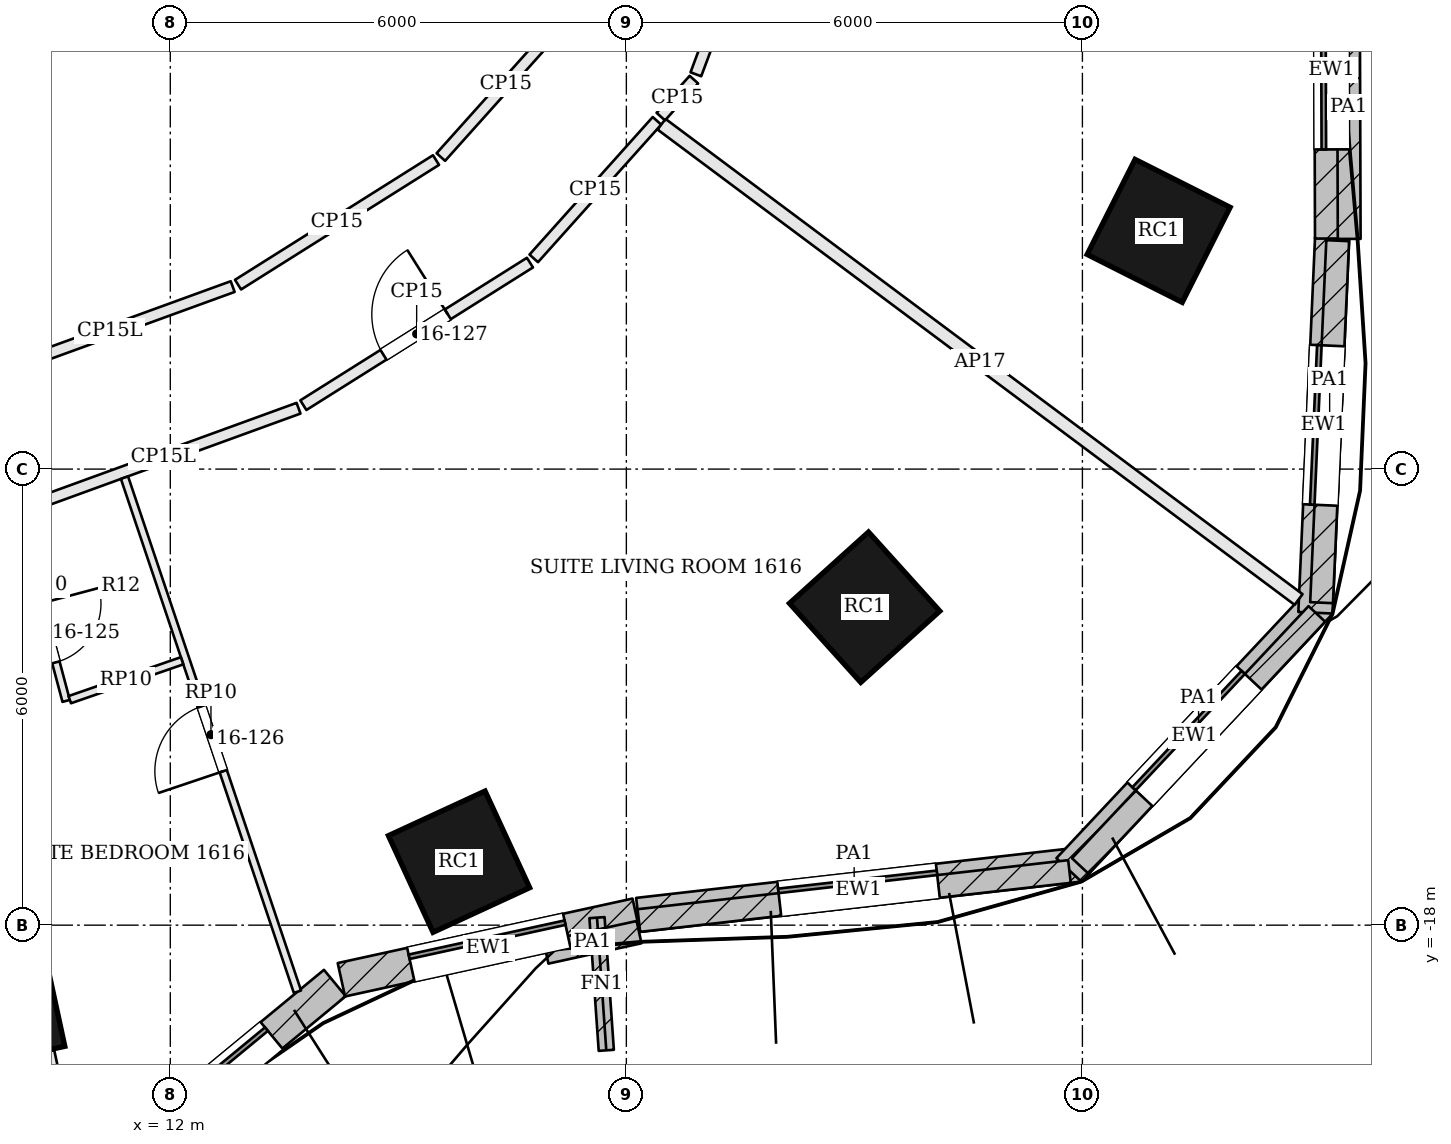
"""IFC4 building model, lengths in metres.
Left out: names, types, materials, properties, quantities, classifications, styles, units other than length and angle.
Written with IfcOpenShell. Run it as: python <this file> out.ifc"""

import sys

from ifc_helpers import new_model, si_unit, direction, frame, frame_2d, origin, origin_2d, place, context, subcontext, project, spatial, rectangle, extrude, element, fill, save


model = new_model("IFC4")
c1 = context("Model", 3, precision=1e-05, world=origin(), true_north=direction((0.0, 1.0)))
c2 = subcontext(c1, "Body", "Model", "MODEL_VIEW")
j1 = project(units=[si_unit("LENGTHUNIT", "METRE"), si_unit("PLANEANGLEUNIT", "RADIAN")], contexts=[c1])
p1 = place(None, origin())
s1 = spatial("IfcSite", under=j1, at=p1, CompositionType="ELEMENT")
p2 = place(p1, origin())
s2 = spatial("IfcBuilding", under=s1, at=p2, CompositionType="ELEMENT")
p3 = place(p2, frame((0.0, 0.0, 73.5)))
s3 = spatial("IfcBuildingStorey", under=s2, at=p3, CompositionType="ELEMENT", Elevation=73.5)
for number, where, z_axis, x_axis in (
    (1, (9.78, -19.058, 0.0), (0.0, 0.0, 1.0), (0.977, 0.211, 0.0)),
    (2, (15.799, -17.165, 0.0), (0.0, 0.0, 1.0), (0.908, 0.419, 0.0)),
    (3, (21.135, -13.817, 0.0), (0.0, 0.0, 1.0), (0.743, 0.67, 0.0)),
    (4, (25.003, -8.866, 0.0), (0.0, 0.0, 1.0), (0.45, 0.893, 0.0)),
):
    element("IfcColumn", number, at=place(p3, frame(where, z_axis=z_axis, x_axis=x_axis)), inside=s3, PredefinedType="COLUMN", context=c2, shape_type="SweptSolid", body=[
        extrude(rectangle(XDim=1.4, YDim=1.4, at=origin_2d()), origin(), (0.0, 0.0, 1.0), 2.8),
    ])
p4 = place(p3, frame((10.879, -21.473, 0.0), z_axis=(0.0, 0.0, 1.0), x_axis=(0.77124668946, 0.636536365023, 0.0)))
e5 = element("IfcWall", 5, at=p4, inside=s3, PredefinedType="SOLIDWALL", context=c2, shape_type="SweptSolid", body=[
    extrude(rectangle(XDim=4.261, YDim=0.45, at=frame_2d((2.13, 0.0))), origin(), (0.0, 0.0, 1.0), 3.3),
])
p5 = place(p4, frame((1.08, 0.0, 0.9)))
e6 = element("IfcOpeningElement", 6, at=p5, cuts=e5, PredefinedType="OPENING", context=c2, shape_type="SweptSolid", body=[
    extrude(rectangle(XDim=2.1, YDim=1.8, at=frame_2d((1.05, 0.9))), frame((0.0, 0.235, 0.0), z_axis=(0.0, -1.0, 0.0), x_axis=(1.0, 0.0, 0.0)), (0.0, 0.0, 1.0), 0.47),
])
p6 = place(p3, frame((14.251, -18.718, 0.0), z_axis=(0.0, 0.0, 1.0), x_axis=(0.976903627618, 0.213680374267, 0.0)))
e7 = element("IfcWall", 7, at=p6, inside=s3, PredefinedType="SOLIDWALL", context=c2, shape_type="SweptSolid", body=[
    extrude(rectangle(XDim=3.97, YDim=0.45, at=frame_2d((1.985, 0.0))), origin(), (0.0, 0.0, 1.0), 3.3),
])
p7 = place(p6, frame((0.935, 0.0, 0.9)))
e8 = element("IfcOpeningElement", 8, at=p7, cuts=e7, PredefinedType="OPENING", context=c2, shape_type="SweptSolid", body=[
    extrude(rectangle(XDim=2.1, YDim=1.8, at=frame_2d((1.05, 0.9))), frame((0.0, 0.235, 0.0), z_axis=(0.0, -1.0, 0.0), x_axis=(1.0, 0.0, 0.0)), (0.0, 0.0, 1.0), 0.47),
])
p8 = place(p3, frame((18.154, -17.865, 0.0), z_axis=(0.0, 0.0, 1.0), x_axis=(0.993572909097, 0.113193967633, 0.0)))
e9 = element("IfcWall", 9, at=p8, inside=s3, PredefinedType="SOLIDWALL", context=c2, shape_type="SweptSolid", body=[
    extrude(rectangle(XDim=5.839, YDim=0.45, at=frame_2d((2.919, 0.0))), origin(), (0.0, 0.0, 1.0), 3.3),
])
p9 = place(p8, frame((1.869, 0.0, 0.9)))
e10 = element("IfcOpeningElement", 10, at=p9, cuts=e9, PredefinedType="OPENING", context=c2, shape_type="SweptSolid", body=[
    extrude(rectangle(XDim=2.1, YDim=1.8, at=frame_2d((1.05, 0.9))), frame((0.0, 0.235, 0.0), z_axis=(0.0, -1.0, 0.0), x_axis=(1.0, 0.0, 0.0)), (0.0, 0.0, 1.0), 0.47),
])
p10 = place(p3, frame((23.822, -17.273, 0.0), z_axis=(0.0, 0.0, 1.0), x_axis=(0.684173167988, 0.729319598122, 0.0)))
e11 = element("IfcWall", 11, at=p10, inside=s3, PredefinedType="SOLIDWALL", context=c2, shape_type="SweptSolid", body=[
    extrude(rectangle(XDim=4.829, YDim=0.45, at=frame_2d((2.415, 0.0))), origin(), (0.0, 0.0, 1.0), 3.3),
])
p11 = place(p10, frame((1.365, 0.0, 0.9)))
e12 = element("IfcOpeningElement", 12, at=p11, cuts=e11, PredefinedType="OPENING", context=c2, shape_type="SweptSolid", body=[
    extrude(rectangle(XDim=2.1, YDim=1.8, at=frame_2d((1.05, 0.9))), frame((0.0, 0.235, 0.0), z_axis=(0.0, -1.0, 0.0), x_axis=(1.0, 0.0, 0.0)), (0.0, 0.0, 1.0), 0.47),
])
p12 = place(p3, frame((27.065, -13.89, 0.0), z_axis=(0.0, 0.0, 1.0), x_axis=(0.044544250924, 0.99900741224, 0.0)))
e13 = element("IfcWall", 13, at=p12, inside=s3, PredefinedType="SOLIDWALL", context=c2, shape_type="SweptSolid", body=[
    extrude(rectangle(XDim=4.938, YDim=0.45, at=frame_2d((2.469, 0.0))), origin(), (0.0, 0.0, 1.0), 3.3),
])
p13 = place(p12, frame((1.419, 0.0, 0.9)))
e14 = element("IfcOpeningElement", 14, at=p13, cuts=e13, PredefinedType="OPENING", context=c2, shape_type="SweptSolid", body=[
    extrude(rectangle(XDim=2.1, YDim=1.8, at=frame_2d((1.05, 0.9))), frame((0.0, 0.235, 0.0), z_axis=(0.0, -1.0, 0.0), x_axis=(1.0, 0.0, 0.0)), (0.0, 0.0, 1.0), 0.47),
])
p14 = place(p3, frame((27.285, -8.967, 0.0), z_axis=(0.0, 0.0, 1.0), x_axis=(-0.003185571797, 0.999994926053, 0.0)))
e15 = element("IfcWall", 15, at=p14, inside=s3, PredefinedType="SOLIDWALL", context=c2, shape_type="SweptSolid", body=[
    extrude(rectangle(XDim=4.445, YDim=0.45, at=frame_2d((2.223, 0.0))), origin(), (0.0, 0.0, 1.0), 3.3),
])
p15 = place(p14, frame((1.173, 0.0, 0.9)))
e16 = element("IfcOpeningElement", 16, at=p15, cuts=e15, PredefinedType="OPENING", context=c2, shape_type="SweptSolid", body=[
    extrude(rectangle(XDim=2.1, YDim=1.8, at=frame_2d((1.05, 0.9))), frame((0.0, 0.235, 0.0), z_axis=(0.0, -1.0, 0.0), x_axis=(1.0, 0.0, 0.0)), (0.0, 0.0, 1.0), 0.47),
])
p16 = place(p3, frame((17.614, -17.901, 0.0), z_axis=(0.0, 0.0, 1.0), x_axis=(0.069750000204, -0.997564502913, 0.0)))
e17 = element("IfcWall", 17, at=p16, inside=s3, PredefinedType="SOLIDWALL", context=c2, shape_type="SweptSolid", body=[
    extrude(rectangle(XDim=1.75, YDim=0.2, at=frame_2d((0.875, 0.0))), origin(), (0.0, 0.0, 1.0), 3.3),
])
p17 = place(p3, frame((10.982, -21.601, 3.6), z_axis=(0.0, 0.0, 1.0), x_axis=(0.771288080572, 0.63648621098, 0.0)))
e18 = element("IfcWall", 18, at=p17, inside=s3, PredefinedType="PARAPET", context=c2, shape_type="SweptSolid", body=[
    extrude(rectangle(XDim=2.603, YDim=0.3, at=frame_2d((1.301, 0.0))), origin(), (0.0, 0.0, 1.0), 1.1),
])
p18 = place(p3, frame((16.943, -18.36, 3.6), z_axis=(0.0, 0.0, 1.0), x_axis=(0.976910180777, 0.213650412343, 0.0)))
e19 = element("IfcWall", 19, at=p18, inside=s3, PredefinedType="PARAPET", context=c2, shape_type="SweptSolid", body=[
    extrude(rectangle(XDim=1.254, YDim=0.3, at=frame_2d((0.627, 0.0))), origin(), (0.0, 0.0, 1.0), 1.1),
])
p19 = place(p3, frame((18.165, -17.939, 3.6), z_axis=(0.0, 0.0, 1.0), x_axis=(0.99357552433, 0.113171009774, 0.0)))
e20 = element("IfcWall", 20, at=p19, inside=s3, PredefinedType="PARAPET", context=c2, shape_type="SweptSolid", body=[
    extrude(rectangle(XDim=5.702, YDim=0.3, at=frame_2d((2.851, 0.0))), origin(), (0.0, 0.0, 1.0), 1.1),
])
p20 = place(p3, frame((23.972, -17.222, 3.6), z_axis=(0.0, 0.0, 1.0), x_axis=(0.684173231326, 0.729319538705, 0.0)))
e21 = element("IfcWall", 21, at=p20, inside=s3, PredefinedType="PARAPET", context=c2, shape_type="SweptSolid", body=[
    extrude(rectangle(XDim=4.548, YDim=0.3, at=frame_2d((2.274, 0.0))), origin(), (0.0, 0.0, 1.0), 1.1),
])
p21 = place(p3, frame((27.146, -13.757, 3.6), z_axis=(0.0, 0.0, 1.0), x_axis=(0.044503972994, 0.999009207359, 0.0)))
e22 = element("IfcWall", 22, at=p21, inside=s3, PredefinedType="PARAPET", context=c2, shape_type="SweptSolid", body=[
    extrude(rectangle(XDim=4.767, YDim=0.3, at=frame_2d((2.384, 0.0))), origin(), (0.0, 0.0, 1.0), 1.1),
])
p22 = place(p3, frame((27.51, -8.972, 3.6), z_axis=(0.0, 0.0, 1.0), x_axis=(-0.003236912182, 0.999994761186, 0.0)))
e23 = element("IfcWall", 23, at=p22, inside=s3, PredefinedType="PARAPET", context=c2, shape_type="SweptSolid", body=[
    extrude(rectangle(XDim=3.469, YDim=0.3, at=frame_2d((1.735, 0.0))), origin(), (0.0, 0.0, 1.0), 1.1),
])
p23 = place(p3, frame((10.741, -21.29, 0.0), z_axis=(0.0, 0.0, 1.0), x_axis=(-0.212673207196, 0.977123383683, 0.0)))
e24 = element("IfcWall", 24, at=p23, inside=s3, PredefinedType="PARTITIONING", context=c2, shape_type="SweptSolid", body=[
    extrude(rectangle(XDim=1.665, YDim=0.175, at=frame_2d((0.832, 0.0))), origin(), (0.0, 0.0, 1.0), 2.28),
])
p24 = place(p3, frame((10.128, -12.494, 0.0), z_axis=(0.0, 0.0, 1.0), x_axis=(0.939720005412, 0.341944895309, 0.0)))
e25 = element("IfcWall", 25, at=p24, inside=s3, PredefinedType="PARTITIONING", context=c2, shape_type="SweptSolid", body=[
    extrude(rectangle(XDim=3.788, YDim=0.15, at=frame_2d((1.894, 0.0))), origin(), (0.0, 0.0, 1.0), 2.58),
])
p25 = place(p3, frame((13.751, -11.159, 0.0), z_axis=(0.0, 0.0, 1.0), x_axis=(0.846413381026, 0.532526420396, 0.0)))
e26 = element("IfcWall", 26, at=p25, inside=s3, PredefinedType="PARTITIONING", context=c2, shape_type="SweptSolid", body=[
    extrude(rectangle(XDim=3.522, YDim=0.15, at=frame_2d((1.761, 0.0))), origin(), (0.0, 0.0, 1.0), 2.684),
])
p26 = place(p25, frame((1.245, 0.0, 0.0)))
e27 = element("IfcOpeningElement", 27, at=p26, cuts=e26, PredefinedType="OPENING", context=c2, shape_type="SweptSolid", body=[
    extrude(rectangle(XDim=1.0, YDim=2.1, at=frame_2d((0.5, 1.05))), frame((0.0, 0.085, 0.0), z_axis=(0.0, -1.0, 0.0), x_axis=(1.0, 0.0, 0.0)), (0.0, 0.0, 1.0), 0.17),
])
p27 = place(p3, frame((16.781, -9.228, 0.0), z_axis=(0.0, 0.0, 1.0), x_axis=(0.667308710912, 0.744781232538, 0.0)))
e28 = element("IfcWall", 28, at=p27, inside=s3, PredefinedType="PARTITIONING", context=c2, shape_type="SweptSolid", body=[
    extrude(rectangle(XDim=2.43, YDim=0.15, at=frame_2d((1.215, 0.0))), origin(), (0.0, 0.0, 1.0), 2.684),
])
p28 = place(p3, frame((26.844, -13.716, 0.0), z_axis=(0.0, 0.0, 1.0), x_axis=(-0.801529984423, 0.597954583619, 0.0)))
e29 = element("IfcWall", 29, at=p28, inside=s3, PredefinedType="PARTITIONING", context=c2, shape_type="SweptSolid", body=[
    extrude(rectangle(XDim=10.456, YDim=0.175, at=frame_2d((5.228, 0.0))), origin(), (0.0, 0.0, 1.0), 2.798),
])
p29 = place(p3, frame((18.453, -7.362, 0.0), z_axis=(0.0, 0.0, 1.0), x_axis=(0.667330462125, 0.744761743325, 0.0)))
e30 = element("IfcWall", 30, at=p29, inside=s3, PredefinedType="PARTITIONING", context=c2, shape_type="SweptSolid", body=[
    extrude(rectangle(XDim=0.653, YDim=0.15, at=frame_2d((0.326, 0.0))), origin(), (0.0, 0.0, 1.0), 2.684),
])
p30 = place(p3, frame((18.915, -6.806, 0.0), z_axis=(0.0, 0.0, 1.0), x_axis=(0.349452792603, 0.936953972051, 0.0)))
e31 = element("IfcWall", 31, at=p30, inside=s3, PredefinedType="PARTITIONING", context=c2, shape_type="SweptSolid", body=[
    extrude(rectangle(XDim=3.925, YDim=0.15, at=frame_2d((1.962, 0.0))), origin(), (0.0, 0.0, 1.0), 2.684),
])
p31 = place(p3, frame((17.271, -5.984, 0.0), z_axis=(0.0, 0.0, 1.0), x_axis=(-0.667301130907, -0.744788023997, 0.0)))
e32 = element("IfcWall", 32, at=p31, inside=s3, PredefinedType="PARTITIONING", context=c2, shape_type="SweptSolid", body=[
    extrude(rectangle(XDim=2.565, YDim=0.15, at=frame_2d((1.282, 0.0))), origin(), (0.0, 0.0, 1.0), 2.684),
])
p32 = place(p3, frame((15.496, -7.934, 0.0), z_axis=(0.0, 0.0, 1.0), x_axis=(-0.846358667139, -0.532613374371, 0.0)))
e33 = element("IfcWall", 33, at=p32, inside=s3, PredefinedType="PARTITIONING", context=c2, shape_type="SweptSolid", body=[
    extrude(rectangle(XDim=3.078, YDim=0.15, at=frame_2d((1.539, 0.0))), origin(), (0.0, 0.0, 1.0), 2.684),
])
p33 = place(p3, frame((12.821, -9.599, 0.0), z_axis=(0.0, 0.0, 1.0), x_axis=(-0.939712560326, -0.341965354921, 0.0)))
e34 = element("IfcWall", 34, at=p33, inside=s3, PredefinedType="PARTITIONING", context=c2, shape_type="SweptSolid", body=[
    extrude(rectangle(XDim=3.439, YDim=0.15, at=frame_2d((1.719, 0.0))), origin(), (0.0, 0.0, 1.0), 2.58),
])
p34 = place(p3, frame((13.673, -18.876, 0.0), z_axis=(0.0, 0.0, 1.0), x_axis=(-0.318864359282, 0.947800358926, 0.0)))
e35 = element("IfcWall", 35, at=p34, inside=s3, PredefinedType="PARTITIONING", context=c2, shape_type="SweptSolid", body=[
    extrude(rectangle(XDim=7.136, YDim=0.1, at=frame_2d((3.568, 0.0))), origin(), (0.0, 0.0, 1.0), 2.784),
])
p35 = place(p34, frame((3.061, 0.0, 0.0)))
e36 = element("IfcOpeningElement", 36, at=p35, cuts=e35, PredefinedType="OPENING", context=c2, shape_type="SweptSolid", body=[
    extrude(rectangle(XDim=0.9, YDim=2.4, at=frame_2d((0.45, 1.2))), frame((0.0, 0.06, 0.0), z_axis=(0.0, -1.0, 0.0), x_axis=(1.0, 0.0, 0.0)), (0.0, 0.0, 1.0), 0.12),
])
p36 = place(p3, frame((9.979, -12.61, 0.0), z_axis=(0.0, 0.0, 1.0), x_axis=(0.257885322866, -0.966175532836, 0.0)))
e37 = element("IfcWall", 37, at=p36, inside=s3, PredefinedType="PARTITIONING", context=c2, shape_type="SweptSolid", body=[
    extrude(rectangle(XDim=2.525, YDim=0.1, at=frame_2d((1.262, 0.0))), origin(), (0.0, 0.0, 1.0), 2.784),
])
p37 = place(p36, frame((1.2, 0.0, 0.0)))
e38 = element("IfcOpeningElement", 38, at=p37, cuts=e37, PredefinedType="OPENING", context=c2, shape_type="SweptSolid", body=[
    extrude(rectangle(XDim=0.8, YDim=2.1, at=frame_2d((0.4, 1.05))), frame((0.0, 0.06, 0.0), z_axis=(0.0, -1.0, 0.0), x_axis=(1.0, 0.0, 0.0)), (0.0, 0.0, 1.0), 0.12),
])
p38 = place(p3, frame((10.677, -15.033, 0.0), z_axis=(0.0, 0.0, 1.0), x_axis=(0.945015763174, 0.327024780946, 0.0)))
e39 = element("IfcWall", 39, at=p38, inside=s3, PredefinedType="PARTITIONING", context=c2, shape_type="SweptSolid", body=[
    extrude(rectangle(XDim=1.564, YDim=0.1, at=frame_2d((0.782, 0.0))), origin(), (0.0, 0.0, 1.0), 2.784),
])
p39 = place(p5, origin())
e40 = element("IfcWindow", 40, at=p39, inside=s3, PartitioningType="SINGLE_PANEL", PredefinedType="WINDOW", context=c2, shape_type="SweptSolid", body=[
    extrude(rectangle(XDim=2.1, YDim=1.8, at=frame_2d((1.05, 0.9))), frame((0.0, 0.135, 0.0), z_axis=(0.0, -1.0, 0.0), x_axis=(1.0, 0.0, 0.0)), (0.0, 0.0, 1.0), 0.06),
])
fill(e6, e40)
p40 = place(p7, origin())
e41 = element("IfcWindow", 41, at=p40, inside=s3, PartitioningType="SINGLE_PANEL", PredefinedType="WINDOW", context=c2, shape_type="SweptSolid", body=[
    extrude(rectangle(XDim=2.1, YDim=1.8, at=frame_2d((1.05, 0.9))), frame((0.0, 0.135, 0.0), z_axis=(0.0, -1.0, 0.0), x_axis=(1.0, 0.0, 0.0)), (0.0, 0.0, 1.0), 0.06),
])
fill(e8, e41)
p41 = place(p9, origin())
e42 = element("IfcWindow", 42, at=p41, inside=s3, PartitioningType="SINGLE_PANEL", PredefinedType="WINDOW", context=c2, shape_type="SweptSolid", body=[
    extrude(rectangle(XDim=2.1, YDim=1.8, at=frame_2d((1.05, 0.9))), frame((0.0, 0.135, 0.0), z_axis=(0.0, -1.0, 0.0), x_axis=(1.0, 0.0, 0.0)), (0.0, 0.0, 1.0), 0.06),
])
fill(e10, e42)
p42 = place(p11, origin())
e43 = element("IfcWindow", 43, at=p42, inside=s3, PartitioningType="SINGLE_PANEL", PredefinedType="WINDOW", context=c2, shape_type="SweptSolid", body=[
    extrude(rectangle(XDim=2.1, YDim=1.8, at=frame_2d((1.05, 0.9))), frame((0.0, 0.135, 0.0), z_axis=(0.0, -1.0, 0.0), x_axis=(1.0, 0.0, 0.0)), (0.0, 0.0, 1.0), 0.06),
])
fill(e12, e43)
p43 = place(p13, origin())
e44 = element("IfcWindow", 44, at=p43, inside=s3, PartitioningType="SINGLE_PANEL", PredefinedType="WINDOW", context=c2, shape_type="SweptSolid", body=[
    extrude(rectangle(XDim=2.1, YDim=1.8, at=frame_2d((1.05, 0.9))), frame((0.0, 0.135, 0.0), z_axis=(0.0, -1.0, 0.0), x_axis=(1.0, 0.0, 0.0)), (0.0, 0.0, 1.0), 0.06),
])
fill(e14, e44)
p44 = place(p15, origin())
e45 = element("IfcWindow", 45, at=p44, inside=s3, PartitioningType="SINGLE_PANEL", PredefinedType="WINDOW", context=c2, shape_type="SweptSolid", body=[
    extrude(rectangle(XDim=2.1, YDim=1.8, at=frame_2d((1.05, 0.9))), frame((0.0, 0.135, 0.0), z_axis=(0.0, -1.0, 0.0), x_axis=(1.0, 0.0, 0.0)), (0.0, 0.0, 1.0), 0.06),
])
fill(e16, e45)
p45 = place(p37, origin())
e46 = element("IfcDoor", 46, at=p45, inside=s3, OperationType="SINGLE_SWING_LEFT", PredefinedType="DOOR", context=c2, shape_type="SweptSolid", body=[
    extrude(rectangle(XDim=0.8, YDim=2.1, at=frame_2d((0.4, 1.05))), frame((0.0, 0.025, 0.0), z_axis=(0.0, -1.0, 0.0), x_axis=(1.0, 0.0, 0.0)), (0.0, 0.0, 1.0), 0.05),
])
fill(e38, e46)
p46 = place(p35, origin())
e47 = element("IfcDoor", 47, at=p46, inside=s3, OperationType="SINGLE_SWING_LEFT", PredefinedType="DOOR", context=c2, shape_type="SweptSolid", body=[
    extrude(rectangle(XDim=0.9, YDim=2.4, at=frame_2d((0.45, 1.2))), frame((0.0, 0.025, 0.0), z_axis=(0.0, -1.0, 0.0), x_axis=(1.0, 0.0, 0.0)), (0.0, 0.0, 1.0), 0.05),
])
fill(e36, e47)
p47 = place(p26, origin())
e48 = element("IfcDoor", 48, at=p47, inside=s3, OperationType="SINGLE_SWING_RIGHT", PredefinedType="DOOR", context=c2, shape_type="SweptSolid", body=[
    extrude(rectangle(XDim=1.0, YDim=2.1, at=frame_2d((0.5, 1.05))), frame((0.0, 0.025, 0.0), z_axis=(0.0, -1.0, 0.0), x_axis=(1.0, 0.0, 0.0)), (0.0, 0.0, 1.0), 0.05),
])
fill(e27, e48)
save(model, sys.argv[1])
